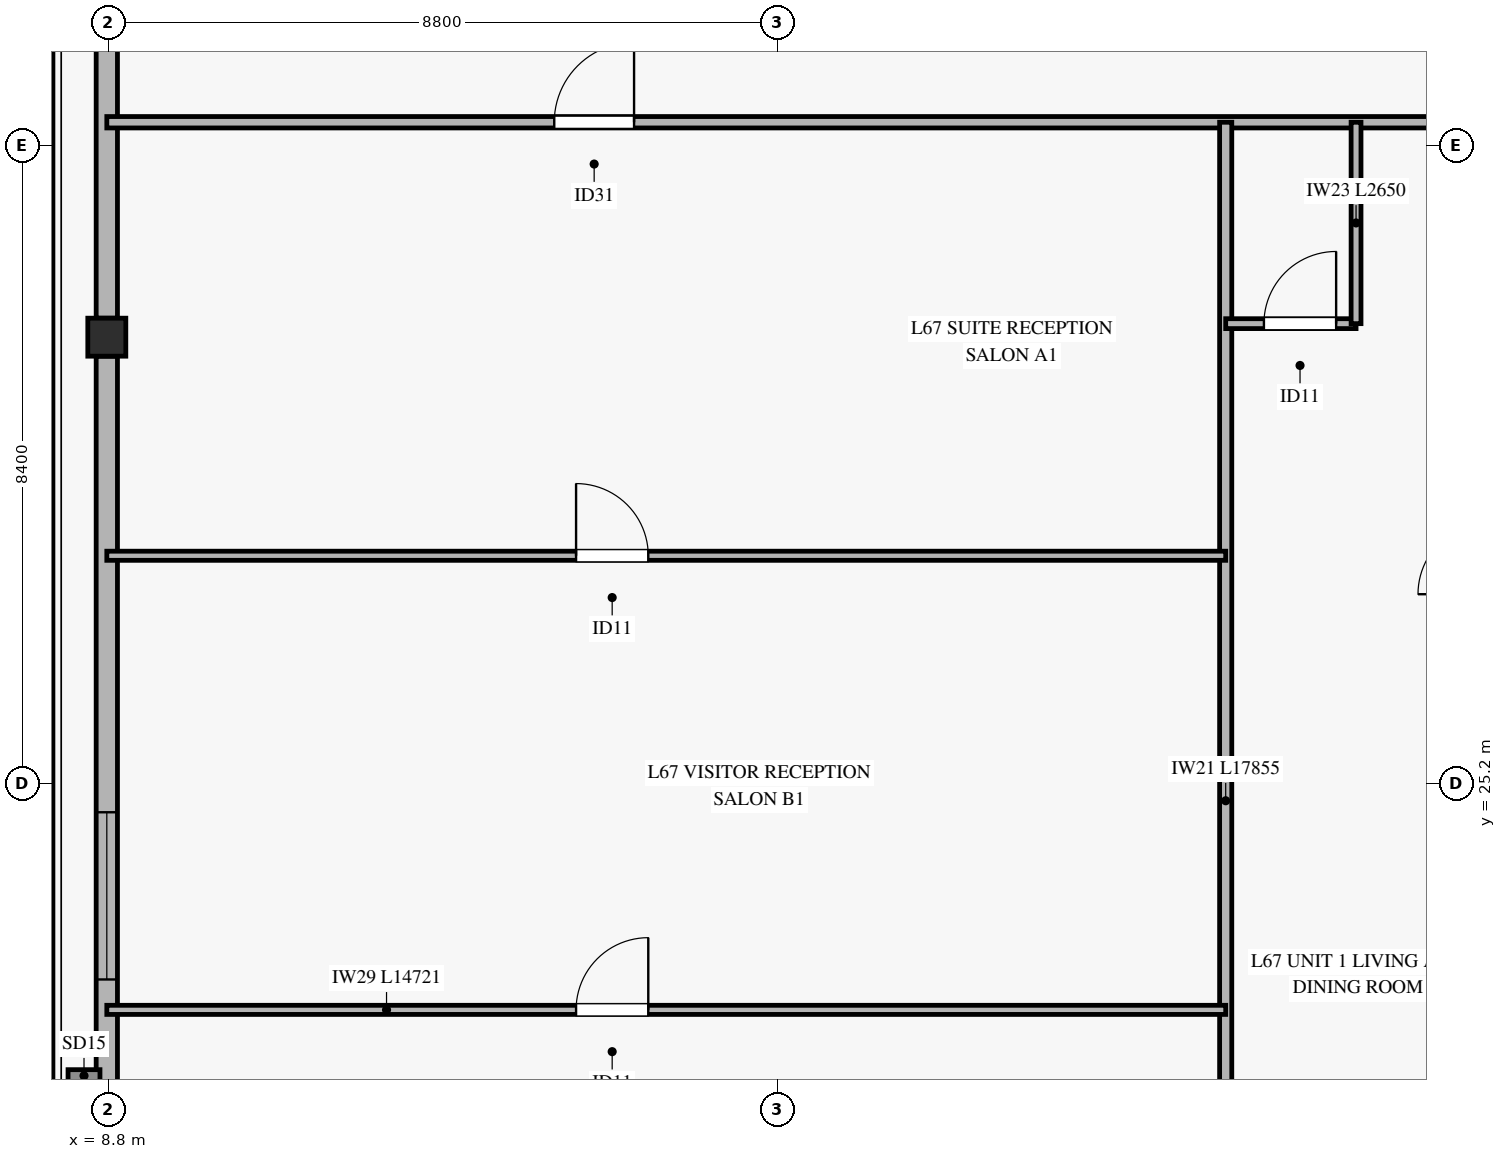
"""IFC4 building model, lengths in metres.
Left out: names, types, materials, properties, quantities, classifications, styles, units other than length and angle.
Written with IfcOpenShell. Run it as: python <this file> out.ifc"""

import sys

from ifc_helpers import new_model, si_unit, direction, frame, frame_2d, origin, origin_2d, place, context, subcontext, project, spatial, rectangle, hollow_rectangle, extrude, source, transform, mapped, element, fill, save


model = new_model("IFC4")
c1 = context("Model", 3, precision=1e-05, world=origin(), true_north=direction((0.0, 1.0)))
c2 = subcontext(c1, "Body", "Model", "MODEL_VIEW")
j1 = project(units=[si_unit("LENGTHUNIT", "METRE"), si_unit("PLANEANGLEUNIT", "RADIAN")], contexts=[c1])
p1 = place(None, origin())
s1 = spatial("IfcSite", under=j1, at=p1, CompositionType="ELEMENT")
p2 = place(p1, origin())
s2 = spatial("IfcBuilding", under=s1, at=p2, CompositionType="ELEMENT")
p3 = place(p2, frame((0.0, 0.0, 262.1)))
s3 = spatial("IfcBuildingStorey", under=s2, at=p3, CompositionType="ELEMENT", Elevation=262.1)
m1 = source(origin(), c2, "Body", "SweptSolid", [
    extrude(hollow_rectangle(XDim=0.5, YDim=0.5, WallThickness=0.024, at=origin_2d()), origin(), (0.0, 0.0, 1.0), 3.185),
])
p4 = place(p3, frame((8.779, 31.072, 0.0), z_axis=(0.0, 0.0, 1.0), x_axis=(1.0, 0.0, 0.0)))
e1 = element("IfcColumn", 1, at=p4, inside=s3, PredefinedType="COLUMN", context=c2, shape_type="MappedRepresentation", body=[
    mapped(m1, transform((0.0, 0.0, 0.0), x_axis=(1.0, 0.0, 0.0), y_axis=(0.0, 1.0, 0.0), z_axis=(0.0, 0.0, 1.0), scale=1.0)),
])
p5 = place(p3, frame((8.779, 18.614, 0.0), z_axis=(0.0, 0.0, 1.0), x_axis=(0.0, 1.0, 0.0)))
e2 = element("IfcWall", 2, at=p5, inside=s3, PredefinedType="SOLIDWALL", context=c2, shape_type="SweptSolid", body=[
    extrude(rectangle(XDim=12.208, YDim=0.28, at=frame_2d((6.104, 0.0))), origin(), (0.0, 0.0, 1.0), 2.815),
])
p6 = place(p5, frame((4.007, 0.0, 0.45)))
e3 = element("IfcOpeningElement", 3, at=p6, cuts=e2, PredefinedType="OPENING", context=c2, shape_type="SweptSolid", body=[
    extrude(rectangle(XDim=2.2, YDim=2.1, at=frame_2d((1.1, 1.05))), frame((0.0, 0.15, 0.0), z_axis=(0.0, -1.0, 0.0), x_axis=(1.0, 0.0, 0.0)), (0.0, 0.0, 1.0), 0.3),
])
p7 = place(p3, frame((8.779, 31.322, 0.0), z_axis=(0.0, 0.0, 1.0), x_axis=(0.0, 1.0, 0.0)))
e4 = element("IfcWall", 4, at=p7, inside=s3, PredefinedType="SOLIDWALL", context=c2, shape_type="SweptSolid", body=[
    extrude(rectangle(XDim=12.208, YDim=0.28, at=frame_2d((6.104, 0.0))), origin(), (0.0, 0.0, 1.0), 2.815),
])
p8 = place(p7, frame((7.171, 0.0, 0.45)))
e5 = element("IfcOpeningElement", 5, at=p8, cuts=e4, PredefinedType="OPENING", context=c2, shape_type="SweptSolid", body=[
    extrude(rectangle(XDim=2.2, YDim=2.1, at=frame_2d((1.1, 1.05))), frame((0.0, 0.15, 0.0), z_axis=(0.0, -1.0, 0.0), x_axis=(1.0, 0.0, 0.0)), (0.0, 0.0, 1.0), 0.3),
])
p9 = place(p3, frame((8.779, 33.9, 0.0), z_axis=(0.0, 0.0, 1.0), x_axis=(1.0, 0.0, 0.0)))
e6 = element("IfcWall", 6, at=p9, inside=s3, PredefinedType="PARTITIONING", context=c2, shape_type="SweptSolid", body=[
    extrude(rectangle(XDim=52.843, YDim=0.15, at=frame_2d((26.421, 0.0))), origin(), (0.0, 0.0, 1.0), 2.47),
])
p10 = place(p9, frame((5.887, 0.0, 0.0)))
e7 = element("IfcOpeningElement", 7, at=p10, cuts=e6, PredefinedType="OPENING", context=c2, shape_type="SweptSolid", body=[
    extrude(rectangle(XDim=1.05, YDim=2.15, at=frame_2d((0.525, 1.075))), frame((0.0, 0.085, 0.0), z_axis=(0.0, -1.0, 0.0), x_axis=(1.0, 0.0, 0.0)), (0.0, 0.0, 1.0), 0.17),
])
p11 = place(p9, frame((17.646, 0.0, 0.0)))
e8 = element("IfcOpeningElement", 8, at=p11, cuts=e6, PredefinedType="OPENING", context=c2, shape_type="SweptSolid", body=[
    extrude(rectangle(XDim=1.05, YDim=2.15, at=frame_2d((0.525, 1.075))), frame((0.0, 0.085, 0.0), z_axis=(0.0, -1.0, 0.0), x_axis=(1.0, 0.0, 0.0)), (0.0, 0.0, 1.0), 0.17),
])
p12 = place(p9, frame((24.174, 0.0, 0.0)))
e9 = element("IfcOpeningElement", 9, at=p12, cuts=e6, PredefinedType="OPENING", context=c2, shape_type="SweptSolid", body=[
    extrude(rectangle(XDim=1.05, YDim=2.15, at=frame_2d((0.525, 1.075))), frame((0.0, 0.085, 0.0), z_axis=(0.0, -1.0, 0.0), x_axis=(1.0, 0.0, 0.0)), (0.0, 0.0, 1.0), 0.17),
])
p13 = place(p9, frame((31.096, 0.0, 0.0)))
e10 = element("IfcOpeningElement", 10, at=p13, cuts=e6, PredefinedType="OPENING", context=c2, shape_type="SweptSolid", body=[
    extrude(rectangle(XDim=1.05, YDim=2.15, at=frame_2d((0.525, 1.075))), frame((0.0, 0.085, 0.0), z_axis=(0.0, -1.0, 0.0), x_axis=(1.0, 0.0, 0.0)), (0.0, 0.0, 1.0), 0.17),
])
p14 = place(p9, frame((37.241, 0.0, 0.0)))
e11 = element("IfcOpeningElement", 11, at=p14, cuts=e6, PredefinedType="OPENING", context=c2, shape_type="SweptSolid", body=[
    extrude(rectangle(XDim=1.05, YDim=2.15, at=frame_2d((0.525, 1.075))), frame((0.0, 0.085, 0.0), z_axis=(0.0, -1.0, 0.0), x_axis=(1.0, 0.0, 0.0)), (0.0, 0.0, 1.0), 0.17),
])
p15 = place(p9, frame((45.359, 0.0, 0.0)))
e12 = element("IfcOpeningElement", 12, at=p15, cuts=e6, PredefinedType="OPENING", context=c2, shape_type="SweptSolid", body=[
    extrude(rectangle(XDim=1.05, YDim=2.15, at=frame_2d((0.525, 1.075))), frame((0.0, 0.085, 0.0), z_axis=(0.0, -1.0, 0.0), x_axis=(1.0, 0.0, 0.0)), (0.0, 0.0, 1.0), 0.17),
])
p16 = place(p3, frame((23.5, 16.045, 0.0), z_axis=(0.0, 0.0, 1.0), x_axis=(0.0, 1.0, 0.0)))
e13 = element("IfcWall", 13, at=p16, inside=s3, PredefinedType="PARTITIONING", context=c2, shape_type="SweptSolid", body=[
    extrude(rectangle(XDim=17.855, YDim=0.16, at=frame_2d((8.927, 0.0))), origin(), (0.0, 0.0, 1.0), 2.77),
])
p17 = place(p3, frame((8.779, 22.221, 0.0), z_axis=(0.0, 0.0, 1.0), x_axis=(1.0, 0.0, 0.0)))
e14 = element("IfcWall", 14, at=p17, inside=s3, PredefinedType="PARTITIONING", context=c2, shape_type="SweptSolid", body=[
    extrude(rectangle(XDim=14.721, YDim=0.12, at=frame_2d((7.36, 0.0))), origin(), (0.0, 0.0, 1.0), 2.47),
])
p18 = place(p17, frame((6.174, 0.0, 0.0)))
e15 = element("IfcOpeningElement", 15, at=p18, cuts=e14, PredefinedType="OPENING", context=c2, shape_type="SweptSolid", body=[
    extrude(rectangle(XDim=0.95, YDim=2.1, at=frame_2d((0.475, 1.05))), frame((0.0, 0.07, 0.0), z_axis=(0.0, -1.0, 0.0), x_axis=(1.0, 0.0, 0.0)), (0.0, 0.0, 1.0), 0.14),
])
p19 = place(p3, frame((8.779, 28.196, 0.0), z_axis=(0.0, 0.0, 1.0), x_axis=(1.0, 0.0, 0.0)))
e16 = element("IfcWall", 16, at=p19, inside=s3, PredefinedType="PARTITIONING", context=c2, shape_type="SweptSolid", body=[
    extrude(rectangle(XDim=14.721, YDim=0.12, at=frame_2d((7.36, 0.0))), origin(), (0.0, 0.0, 1.0), 2.47),
])
p20 = place(p19, frame((6.174, 0.0, 0.0)))
e17 = element("IfcOpeningElement", 17, at=p20, cuts=e16, PredefinedType="OPENING", context=c2, shape_type="SweptSolid", body=[
    extrude(rectangle(XDim=0.95, YDim=2.1, at=frame_2d((0.475, 1.05))), frame((0.0, 0.07, 0.0), z_axis=(0.0, -1.0, 0.0), x_axis=(1.0, 0.0, 0.0)), (0.0, 0.0, 1.0), 0.14),
])
p21 = place(p3, frame((23.5, 31.25, 0.0), z_axis=(0.0, 0.0, 1.0), x_axis=(1.0, 0.0, 0.0)))
e18 = element("IfcWall", 18, at=p21, inside=s3, PredefinedType="PARTITIONING", context=c2, shape_type="SweptSolid", body=[
    extrude(rectangle(XDim=1.715, YDim=0.13, at=frame_2d((0.857, 0.0))), origin(), (0.0, 0.0, 1.0), 3.185),
])
p22 = place(p21, frame((0.503, 0.0, 0.0)))
e19 = element("IfcOpeningElement", 19, at=p22, cuts=e18, PredefinedType="OPENING", context=c2, shape_type="SweptSolid", body=[
    extrude(rectangle(XDim=0.95, YDim=2.1, at=frame_2d((0.475, 1.05))), frame((0.0, 0.075, 0.0), z_axis=(0.0, -1.0, 0.0), x_axis=(1.0, 0.0, 0.0)), (0.0, 0.0, 1.0), 0.15),
])
p23 = place(p3, frame((25.215, 31.25, 0.0), z_axis=(0.0, 0.0, 1.0), x_axis=(0.0, 1.0, 0.0)))
e20 = element("IfcWall", 20, at=p23, inside=s3, PredefinedType="PARTITIONING", context=c2, shape_type="SweptSolid", body=[
    extrude(rectangle(XDim=2.65, YDim=0.13, at=frame_2d((1.325, 0.0))), origin(), (0.0, 0.0, 1.0), 2.77),
])
m2 = source(origin(), c2, "Body", "SweptSolid", [
    extrude(rectangle(XDim=2.2, YDim=2.1, at=frame_2d((1.1, 1.05))), frame((0.0, 0.03, 0.0), z_axis=(0.0, -1.0, 0.0), x_axis=(1.0, 0.0, 0.0)), (0.0, 0.0, 1.0), 0.06),
])
p24 = place(p6, origin())
e21 = element("IfcWindow", 21, at=p24, inside=s3, PartitioningType="SINGLE_PANEL", PredefinedType="WINDOW", context=c2, shape_type="MappedRepresentation", body=[
    mapped(m2, transform((0.0, 0.0, 0.0), x_axis=(1.0, 0.0, 0.0), y_axis=(0.0, 1.0, 0.0), z_axis=(0.0, 0.0, 1.0), scale=1.0)),
])
fill(e3, e21)
m3 = source(origin(), c2, "Body", "SweptSolid", [
    extrude(rectangle(XDim=1.05, YDim=2.15, at=frame_2d((0.525, 1.075))), frame((0.0, 0.025, 0.0), z_axis=(0.0, -1.0, 0.0), x_axis=(1.0, 0.0, 0.0)), (0.0, 0.0, 1.0), 0.05),
])
p25 = place(p10, origin())
e22 = element("IfcDoor", 22, at=p25, inside=s3, OperationType="SINGLE_SWING_RIGHT", PredefinedType="DOOR", context=c2, shape_type="MappedRepresentation", body=[
    mapped(m3, transform((0.0, 0.0, 0.0), x_axis=(1.0, 0.0, 0.0), y_axis=(0.0, 1.0, 0.0), z_axis=(0.0, 0.0, 1.0), scale=1.0)),
])
fill(e7, e22)
m4 = source(origin(), c2, "Body", "SweptSolid", [
    extrude(rectangle(XDim=0.95, YDim=2.1, at=frame_2d((0.475, 1.05))), frame((0.0, 0.025, 0.0), z_axis=(0.0, -1.0, 0.0), x_axis=(1.0, 0.0, 0.0)), (0.0, 0.0, 1.0), 0.05),
])
p26 = place(p20, origin())
e23 = element("IfcDoor", 23, at=p26, inside=s3, OperationType="SINGLE_SWING_LEFT", PredefinedType="DOOR", context=c2, shape_type="MappedRepresentation", body=[
    mapped(m4, transform((0.0, 0.0, 0.0), x_axis=(1.0, 0.0, 0.0), y_axis=(0.0, 1.0, 0.0), z_axis=(0.0, 0.0, 1.0), scale=1.0)),
])
fill(e17, e23)
p27 = place(p18, origin())
e24 = element("IfcDoor", 24, at=p27, inside=s3, OperationType="SINGLE_SWING_RIGHT", PredefinedType="DOOR", context=c2, shape_type="MappedRepresentation", body=[
    mapped(m4, transform((0.0, 0.0, 0.0), x_axis=(1.0, 0.0, 0.0), y_axis=(0.0, 1.0, 0.0), z_axis=(0.0, 0.0, 1.0), scale=1.0)),
])
fill(e15, e24)
p28 = place(p22, origin())
e25 = element("IfcDoor", 25, at=p28, inside=s3, OperationType="SINGLE_SWING_RIGHT", PredefinedType="DOOR", context=c2, shape_type="MappedRepresentation", body=[
    mapped(m4, transform((0.0, 0.0, 0.0), x_axis=(1.0, 0.0, 0.0), y_axis=(0.0, 1.0, 0.0), z_axis=(0.0, 0.0, 1.0), scale=1.0)),
])
fill(e19, e25)
save(model, sys.argv[1])
